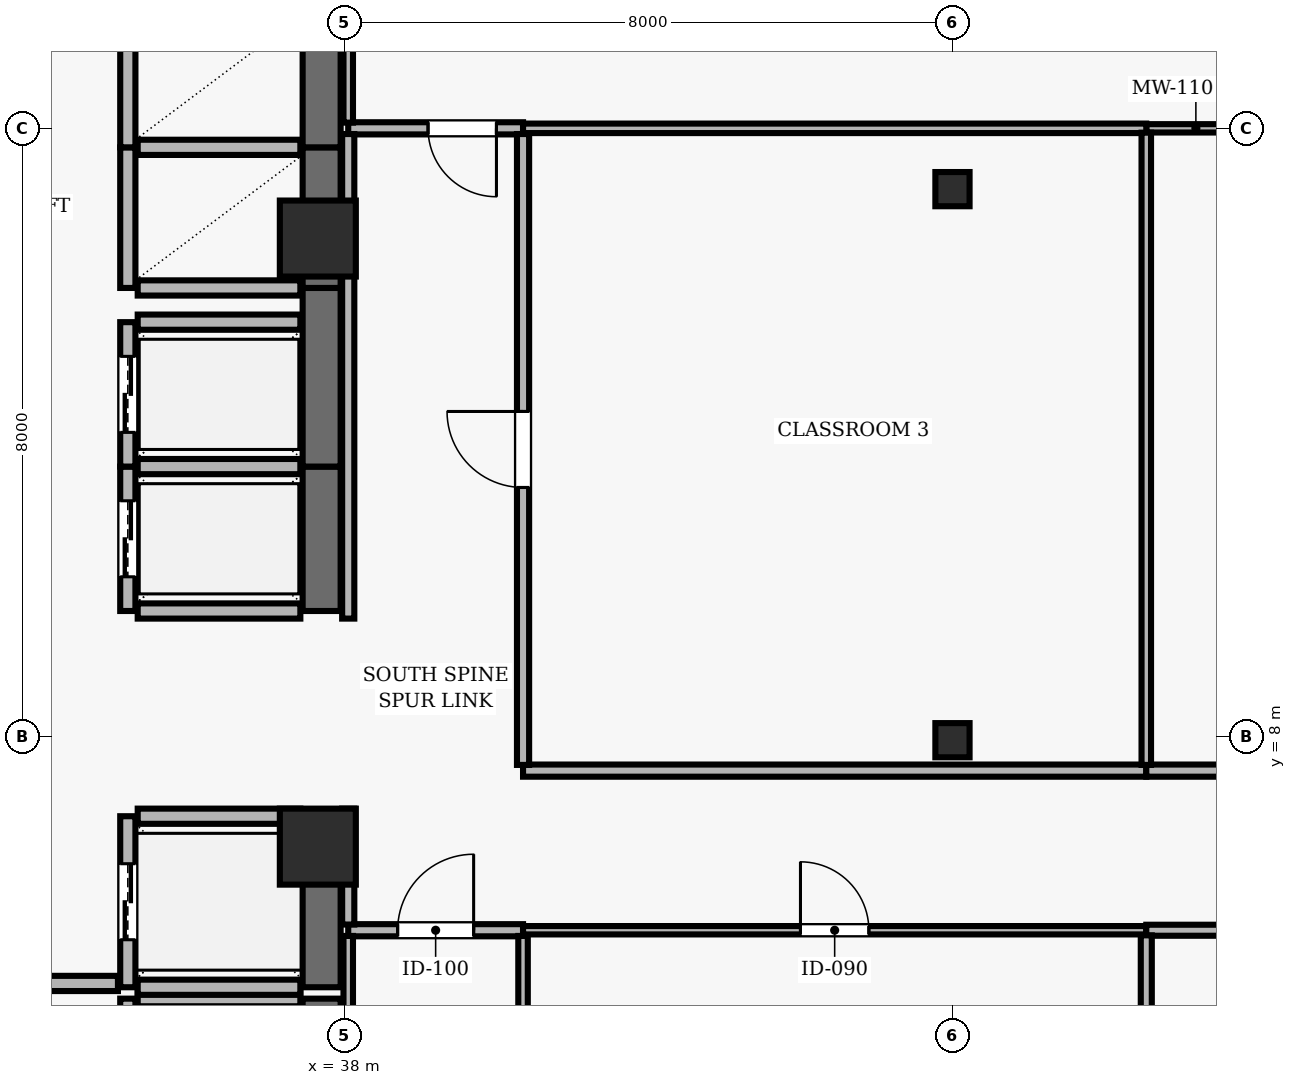
"""IFC4 building model, lengths in metres.
Left out: names, types, materials, properties, quantities, classifications, styles, units other than length and angle.
Written with IfcOpenShell. Run it as: python <this file> out.ifc"""

import sys

from ifc_helpers import new_model, si_unit, direction, frame, frame_2d, origin, origin_2d, place, context, subcontext, project, spatial, rectangle, hollow_rectangle, extrude, element, fill, save


model = new_model("IFC4")
c1 = context("Model", 3, precision=1e-05, world=origin(), true_north=direction((0.0, 1.0)))
c2 = subcontext(c1, "Body", "Model", "MODEL_VIEW")
j1 = project(units=[si_unit("LENGTHUNIT", "METRE"), si_unit("PLANEANGLEUNIT", "RADIAN")], contexts=[c1])
p1 = place(None, origin())
s1 = spatial("IfcSite", under=j1, at=p1, CompositionType="ELEMENT")
p2 = place(p1, origin())
s2 = spatial("IfcBuilding", under=s1, at=p2, CompositionType="ELEMENT")
p3 = place(p2, frame((0.0, 0.0, 183.6)))
s3 = spatial("IfcBuildingStorey", under=s2, at=p3, CompositionType="ELEMENT", Elevation=183.6)
for number, where, z_axis, x_axis in (
    (1, (37.65, 6.55, 0.0), (0.0, 0.0, 1.0), (1.0, 0.0, 0.0)),
    (2, (37.65, 14.55, 0.0), (0.0, 0.0, 1.0), (1.0, 0.0, 0.0)),
):
    element("IfcColumn", number, at=place(p3, frame(where, z_axis=z_axis, x_axis=x_axis)), inside=s3, PredefinedType="COLUMN", context=c2, shape_type="SweptSolid", body=[
        extrude(rectangle(XDim=1.0, YDim=1.0, at=origin_2d()), origin(), (0.0, 0.0, 1.0), 3.9),
    ])
for number, where, z_axis, x_axis in (
    (3, (46.0, 7.95, 0.0), (0.0, 0.0, 1.0), (1.0, 0.0, 0.0)),
    (4, (46.0, 15.2, 0.0), (0.0, 0.0, 1.0), (1.0, 0.0, 0.0)),
):
    element("IfcColumn", number, at=place(p3, frame(where, z_axis=z_axis, x_axis=x_axis)), inside=s3, PredefinedType="COLUMN", context=c2, shape_type="SweptSolid", body=[
        extrude(hollow_rectangle(XDim=0.45, YDim=0.45, WallThickness=0.02, at=origin_2d()), origin(), (0.0, 0.0, 1.0), 3.9),
    ])
p4 = place(p3, frame((35.15, 4.55, 0.0), z_axis=(0.0, 0.0, 1.0), x_axis=(0.0, -1.0, 0.0)))
e5 = element("IfcWall", 5, at=p4, inside=s3, PredefinedType="SOLIDWALL", context=c2, shape_type="SweptSolid", body=[
    extrude(rectangle(XDim=2.1, YDim=0.2, at=frame_2d((1.05, 0.0))), origin(), (0.0, 0.0, 1.0), 3.69),
])
p5 = place(p4, frame((0.45, 0.0, 0.0)))
e6 = element("IfcOpeningElement", 6, at=p5, cuts=e5, PredefinedType="OPENING", context=c2, shape_type="SweptSolid", body=[
    extrude(rectangle(XDim=1.2, YDim=2.15, at=frame_2d((0.6, 1.075))), frame((0.0, 0.11, 0.0), z_axis=(0.0, -1.0, 0.0), x_axis=(1.0, 0.0, 0.0)), (0.0, 0.0, 1.0), 0.22),
])
p6 = place(p3, frame((37.7, 2.45, 0.0), z_axis=(0.0, 0.0, 1.0), x_axis=(0.0, 1.0, 0.0)))
e7 = element("IfcWall", 7, at=p6, inside=s3, PredefinedType="SHEAR", context=c2, shape_type="SweptSolid", body=[
    extrude(rectangle(XDim=2.1, YDim=0.5, at=frame_2d((1.05, 0.0))), origin(), (0.0, 0.0, 1.0), 3.69),
])
p7 = place(p3, frame((37.42, 4.55, 0.0), z_axis=(0.0, 0.0, 1.0), x_axis=(-1.0, 0.0, 0.0)))
e8 = element("IfcWall", 8, at=p7, inside=s3, PredefinedType="SOLIDWALL", context=c2, shape_type="SweptSolid", body=[
    extrude(rectangle(XDim=2.14, YDim=0.2, at=frame_2d((1.07, 0.0))), origin(), (0.0, 0.0, 1.0), 3.69),
])
p8 = place(p3, frame((35.15, 6.95, 0.0), z_axis=(0.0, 0.0, 1.0), x_axis=(0.0, -1.0, 0.0)))
e9 = element("IfcWall", 9, at=p8, inside=s3, PredefinedType="SOLIDWALL", context=c2, shape_type="SweptSolid", body=[
    extrude(rectangle(XDim=2.25, YDim=0.2, at=frame_2d((1.125, 0.0))), origin(), (0.0, 0.0, 1.0), 3.69),
])
p9 = place(p8, frame((0.625, 0.0, 0.0)))
e10 = element("IfcOpeningElement", 10, at=p9, cuts=e9, PredefinedType="OPENING", context=c2, shape_type="SweptSolid", body=[
    extrude(rectangle(XDim=1.0, YDim=2.1, at=frame_2d((0.5, 1.05))), frame((0.0, 0.11, 0.0), z_axis=(0.0, -1.0, 0.0), x_axis=(1.0, 0.0, 0.0)), (0.0, 0.0, 1.0), 0.22),
])
p10 = place(p3, frame((37.7, 4.7, 0.0), z_axis=(0.0, 0.0, 1.0), x_axis=(0.0, 1.0, 0.0)))
e11 = element("IfcWall", 11, at=p10, inside=s3, PredefinedType="SHEAR", context=c2, shape_type="SweptSolid", body=[
    extrude(rectangle(XDim=2.25, YDim=0.5, at=frame_2d((1.125, 0.0))), origin(), (0.0, 0.0, 1.0), 3.69),
])
for number, where, z_axis, x_axis in (
    (12, (35.28, 4.7, 0.0), (0.0, 0.0, 1.0), (1.0, 0.0, 0.0)),
    (13, (37.42, 6.95, 0.0), (0.0, 0.0, 1.0), (-1.0, 0.0, 0.0)),
):
    element("IfcWall", number, at=place(p3, frame(where, z_axis=z_axis, x_axis=x_axis)), inside=s3, PredefinedType="SOLIDWALL", context=c2, shape_type="SweptSolid", body=[
        extrude(rectangle(XDim=2.14, YDim=0.2, at=frame_2d((1.07, 0.0))), origin(), (0.0, 0.0, 1.0), 3.69),
    ])
p11 = place(p3, frame((35.15, 11.55, 0.0), z_axis=(0.0, 0.0, 1.0), x_axis=(0.0, -1.0, 0.0)))
e14 = element("IfcWall", 14, at=p11, inside=s3, PredefinedType="SOLIDWALL", context=c2, shape_type="SweptSolid", body=[
    extrude(rectangle(XDim=1.9, YDim=0.2, at=frame_2d((0.95, 0.0))), origin(), (0.0, 0.0, 1.0), 3.69),
])
p12 = place(p11, frame((0.45, 0.0, 0.0)))
e15 = element("IfcOpeningElement", 15, at=p12, cuts=e14, PredefinedType="OPENING", context=c2, shape_type="SweptSolid", body=[
    extrude(rectangle(XDim=1.0, YDim=2.1, at=frame_2d((0.5, 1.05))), frame((0.0, 0.11, 0.0), z_axis=(0.0, -1.0, 0.0), x_axis=(1.0, 0.0, 0.0)), (0.0, 0.0, 1.0), 0.22),
])
p13 = place(p3, frame((37.7, 9.65, 0.0), z_axis=(0.0, 0.0, 1.0), x_axis=(0.0, 1.0, 0.0)))
e16 = element("IfcWall", 16, at=p13, inside=s3, PredefinedType="SHEAR", context=c2, shape_type="SweptSolid", body=[
    extrude(rectangle(XDim=1.9, YDim=0.5, at=frame_2d((0.95, 0.0))), origin(), (0.0, 0.0, 1.0), 3.69),
])
for number, where, z_axis, x_axis in (
    (17, (35.28, 9.65, 0.0), (0.0, 0.0, 1.0), (1.0, 0.0, 0.0)),
    (18, (37.42, 11.55, 0.0), (0.0, 0.0, 1.0), (-1.0, 0.0, 0.0)),
):
    element("IfcWall", number, at=place(p3, frame(where, z_axis=z_axis, x_axis=x_axis)), inside=s3, PredefinedType="SOLIDWALL", context=c2, shape_type="SweptSolid", body=[
        extrude(rectangle(XDim=2.14, YDim=0.2, at=frame_2d((1.07, 0.0))), origin(), (0.0, 0.0, 1.0), 3.69),
    ])
p14 = place(p3, frame((35.15, 13.45, 0.0), z_axis=(0.0, 0.0, 1.0), x_axis=(0.0, -1.0, 0.0)))
e19 = element("IfcWall", 19, at=p14, inside=s3, PredefinedType="SOLIDWALL", context=c2, shape_type="SweptSolid", body=[
    extrude(rectangle(XDim=1.9, YDim=0.2, at=frame_2d((0.95, 0.0))), origin(), (0.0, 0.0, 1.0), 3.69),
])
p15 = place(p14, frame((0.45, 0.0, 0.0)))
e20 = element("IfcOpeningElement", 20, at=p15, cuts=e19, PredefinedType="OPENING", context=c2, shape_type="SweptSolid", body=[
    extrude(rectangle(XDim=1.0, YDim=2.1, at=frame_2d((0.5, 1.05))), frame((0.0, 0.11, 0.0), z_axis=(0.0, -1.0, 0.0), x_axis=(1.0, 0.0, 0.0)), (0.0, 0.0, 1.0), 0.22),
])
p16 = place(p3, frame((37.7, 11.55, 0.0), z_axis=(0.0, 0.0, 1.0), x_axis=(0.0, 1.0, 0.0)))
e21 = element("IfcWall", 21, at=p16, inside=s3, PredefinedType="SHEAR", context=c2, shape_type="SweptSolid", body=[
    extrude(rectangle(XDim=2.35, YDim=0.5, at=frame_2d((1.175, 0.0))), origin(), (0.0, 0.0, 1.0), 3.69),
])
p17 = place(p3, frame((37.42, 13.45, 0.0), z_axis=(0.0, 0.0, 1.0), x_axis=(-1.0, 0.0, 0.0)))
e22 = element("IfcWall", 22, at=p17, inside=s3, PredefinedType="SOLIDWALL", context=c2, shape_type="SweptSolid", body=[
    extrude(rectangle(XDim=2.14, YDim=0.2, at=frame_2d((1.07, 0.0))), origin(), (0.0, 0.0, 1.0), 3.69),
])
p18 = place(p3, frame((35.15, 15.75, 0.0), z_axis=(0.0, 0.0, 1.0), x_axis=(0.0, -1.0, 0.0)))
e23 = element("IfcWall", 23, at=p18, inside=s3, PredefinedType="SOLIDWALL", context=c2, shape_type="SweptSolid", body=[
    extrude(rectangle(XDim=1.85, YDim=0.2, at=frame_2d((0.925, 0.0))), origin(), (0.0, 0.0, 1.0), 3.69),
])
p19 = place(p3, frame((37.7, 13.9, 0.0), z_axis=(0.0, 0.0, 1.0), x_axis=(0.0, 1.0, 0.0)))
e24 = element("IfcWall", 24, at=p19, inside=s3, PredefinedType="SHEAR", context=c2, shape_type="SweptSolid", body=[
    extrude(rectangle(XDim=1.85, YDim=0.5, at=frame_2d((0.925, 0.0))), origin(), (0.0, 0.0, 1.0), 3.69),
])
for number, where, z_axis, x_axis in (
    (25, (35.28, 13.9, 0.0), (0.0, 0.0, 1.0), (1.0, 0.0, 0.0)),
    (26, (37.42, 15.75, 0.0), (0.0, 0.0, 1.0), (-1.0, 0.0, 0.0)),
):
    element("IfcWall", number, at=place(p3, frame(where, z_axis=z_axis, x_axis=x_axis)), inside=s3, PredefinedType="SOLIDWALL", context=c2, shape_type="SweptSolid", body=[
        extrude(rectangle(XDim=2.14, YDim=0.2, at=frame_2d((1.07, 0.0))), origin(), (0.0, 0.0, 1.0), 3.69),
    ])
p20 = place(p3, frame((35.15, 17.6, 0.0), z_axis=(0.0, 0.0, 1.0), x_axis=(0.0, -1.0, 0.0)))
e27 = element("IfcWall", 27, at=p20, inside=s3, PredefinedType="SOLIDWALL", context=c2, shape_type="SweptSolid", body=[
    extrude(rectangle(XDim=1.85, YDim=0.2, at=frame_2d((0.925, 0.0))), origin(), (0.0, 0.0, 1.0), 3.69),
])
p21 = place(p3, frame((37.7, 15.75, 0.0), z_axis=(0.0, 0.0, 1.0), x_axis=(0.0, 1.0, 0.0)))
e28 = element("IfcWall", 28, at=p21, inside=s3, PredefinedType="SHEAR", context=c2, shape_type="SweptSolid", body=[
    extrude(rectangle(XDim=1.85, YDim=0.5, at=frame_2d((0.925, 0.0))), origin(), (0.0, 0.0, 1.0), 3.69),
])
p22 = place(p3, frame((35.02, 4.75, 0.0), z_axis=(0.0, 0.0, 1.0), x_axis=(-1.0, 0.0, 0.0)))
e29 = element("IfcWall", 29, at=p22, inside=s3, PredefinedType="SOLIDWALL", context=c2, shape_type="SweptSolid", body=[
    extrude(rectangle(XDim=3.11, YDim=0.2, at=frame_2d((1.555, 0.0))), origin(), (0.0, 0.0, 1.0), 3.69),
])
p23 = place(p22, frame((1.03, 0.0, 0.0)))
e30 = element("IfcOpeningElement", 30, at=p23, cuts=e29, PredefinedType="OPENING", context=c2, shape_type="SweptSolid", body=[
    extrude(rectangle(XDim=1.05, YDim=2.15, at=frame_2d((0.525, 1.075))), frame((0.0, 0.11, 0.0), z_axis=(0.0, -1.0, 0.0), x_axis=(1.0, 0.0, 0.0)), (0.0, 0.0, 1.0), 0.22),
])
p24 = place(p3, frame((38.05, 5.45, 0.0), z_axis=(0.0, 0.0, 1.0), x_axis=(1.0, 0.0, 0.0)))
e31 = element("IfcWall", 31, at=p24, inside=s3, PredefinedType="PARTITIONING", context=c2, shape_type="SweptSolid", body=[
    extrude(rectangle(XDim=2.3, YDim=0.16, at=frame_2d((1.15, 0.0))), origin(), (0.0, 0.0, 1.0), 3.343),
])
p25 = place(p24, frame((0.65, 0.0, 0.0)))
e32 = element("IfcOpeningElement", 32, at=p25, cuts=e31, PredefinedType="OPENING", context=c2, shape_type="SweptSolid", body=[
    extrude(rectangle(XDim=1.0, YDim=2.1, at=frame_2d((0.5, 1.05))), frame((0.0, 0.09, 0.0), z_axis=(0.0, -1.0, 0.0), x_axis=(1.0, 0.0, 0.0)), (0.0, 0.0, 1.0), 0.18),
])
p26 = place(p3, frame((40.35, 5.45, 0.0), z_axis=(0.0, 0.0, 1.0), x_axis=(1.0, 0.0, 0.0)))
e33 = element("IfcWall", 33, at=p26, inside=s3, PredefinedType="MOVABLE", context=c2, shape_type="SweptSolid", body=[
    extrude(rectangle(XDim=8.2, YDim=0.11, at=frame_2d((4.1, 0.0))), origin(), (0.0, 0.0, 1.0), 3.343),
])
p27 = place(p26, frame((3.65, 0.0, 0.0)))
e34 = element("IfcOpeningElement", 34, at=p27, cuts=e33, PredefinedType="OPENING", context=c2, shape_type="SweptSolid", body=[
    extrude(rectangle(XDim=0.9, YDim=2.1, at=frame_2d((0.45, 1.05))), frame((0.0, 0.065, 0.0), z_axis=(0.0, -1.0, 0.0), x_axis=(1.0, 0.0, 0.0)), (0.0, 0.0, 1.0), 0.13),
])
p28 = place(p3, frame((40.35, 16.0, 0.0), z_axis=(0.0, 0.0, 1.0), x_axis=(-1.0, 0.0, 0.0)))
e35 = element("IfcWall", 35, at=p28, inside=s3, PredefinedType="PARTITIONING", context=c2, shape_type="SweptSolid", body=[
    extrude(rectangle(XDim=2.3, YDim=0.16, at=frame_2d((1.15, 0.0))), origin(), (0.0, 0.0, 1.0), 3.69),
])
p29 = place(p28, frame((0.35, 0.0, 0.0)))
e36 = element("IfcOpeningElement", 36, at=p29, cuts=e35, PredefinedType="OPENING", context=c2, shape_type="SweptSolid", body=[
    extrude(rectangle(XDim=0.9, YDim=2.1, at=frame_2d((0.45, 1.05))), frame((0.0, 0.09, 0.0), z_axis=(0.0, -1.0, 0.0), x_axis=(1.0, 0.0, 0.0)), (0.0, 0.0, 1.0), 0.18),
])
p30 = place(p3, frame((48.55, 5.45, 0.0), z_axis=(0.0, 0.0, 1.0), x_axis=(1.0, 0.0, 0.0)))
e37 = element("IfcWall", 37, at=p30, inside=s3, PredefinedType="PARTITIONING", context=c2, shape_type="SweptSolid", body=[
    extrude(rectangle(XDim=9.25, YDim=0.145, at=frame_2d((4.625, 0.0))), origin(), (0.0, 0.0, 1.0), 3.343),
])
p31 = place(p30, frame((4.075, 0.0, 0.0)))
e38 = element("IfcOpeningElement", 38, at=p31, cuts=e37, PredefinedType="OPENING", context=c2, shape_type="SweptSolid", body=[
    extrude(rectangle(XDim=1.1, YDim=2.15, at=frame_2d((0.55, 1.075))), frame((0.0, 0.083, 0.0), z_axis=(0.0, -1.0, 0.0), x_axis=(1.0, 0.0, 0.0)), (0.0, 0.0, 1.0), 0.165),
])
p32 = place(p3, frame((48.55, 7.55, 0.0), z_axis=(0.0, 0.0, 1.0), x_axis=(-1.0, 0.0, 0.0)))
e39 = element("IfcWall", 39, at=p32, inside=s3, PredefinedType="PARTITIONING", context=c2, shape_type="SweptSolid", body=[
    extrude(rectangle(XDim=8.2, YDim=0.16, at=frame_2d((4.1, 0.0))), origin(), (0.0, 0.0, 1.0), 3.139),
])
p33 = place(p3, frame((48.55, 16.0, 0.0), z_axis=(0.0, 0.0, 1.0), x_axis=(1.0, 0.0, 0.0)))
e40 = element("IfcWall", 40, at=p33, inside=s3, PredefinedType="MOVABLE", context=c2, shape_type="SweptSolid", body=[
    extrude(rectangle(XDim=1.305, YDim=0.11, at=frame_2d((0.652, 0.0))), origin(), (0.0, 0.0, 1.0), 3.39),
])
p34 = place(p3, frame((48.55, 16.0, 0.0), z_axis=(0.0, 0.0, 1.0), x_axis=(-1.0, 0.0, 0.0)))
e41 = element("IfcWall", 41, at=p34, inside=s3, PredefinedType="PARTITIONING", context=c2, shape_type="SweptSolid", body=[
    extrude(rectangle(XDim=8.2, YDim=0.125, at=frame_2d((4.1, 0.0))), origin(), (0.0, 0.0, 1.0), 3.39),
])
p35 = place(p3, frame((57.8, 7.55, 0.0), z_axis=(0.0, 0.0, 1.0), x_axis=(-1.0, 0.0, 0.0)))
e42 = element("IfcWall", 42, at=p35, inside=s3, PredefinedType="PARTITIONING", context=c2, shape_type="SweptSolid", body=[
    extrude(rectangle(XDim=9.25, YDim=0.16, at=frame_2d((4.625, 0.0))), origin(), (0.0, 0.0, 1.0), 3.139),
])
p36 = place(p35, frame((3.125, 0.0, 0.0)))
e43 = element("IfcOpeningElement", 43, at=p36, cuts=e42, PredefinedType="OPENING", context=c2, shape_type="SweptSolid", body=[
    extrude(rectangle(XDim=0.9, YDim=2.1, at=frame_2d((0.45, 1.05))), frame((0.0, 0.09, 0.0), z_axis=(0.0, -1.0, 0.0), x_axis=(1.0, 0.0, 0.0)), (0.0, 0.0, 1.0), 0.18),
])
p37 = place(p3, frame((38.05, 5.375, 0.0), z_axis=(0.0, 0.0, 1.0), x_axis=(0.0, -1.0, 0.0)))
e44 = element("IfcWall", 44, at=p37, inside=s3, PredefinedType="PARTITIONING", context=c2, shape_type="SweptSolid", body=[
    extrude(rectangle(XDim=5.23, YDim=0.125, at=frame_2d((2.615, 0.0))), origin(), (0.0, 0.0, 1.0), 3.139),
])
p38 = place(p3, frame((38.05, 7.05, 0.0), z_axis=(0.0, 0.0, 1.0), x_axis=(0.0, -1.0, 0.0)))
e45 = element("IfcWall", 45, at=p38, inside=s3, PredefinedType="PARTITIONING", context=c2, shape_type="SweptSolid", body=[
    extrude(rectangle(XDim=1.525, YDim=0.16, at=frame_2d((0.763, 0.0))), origin(), (0.0, 0.0, 1.0), 3.139),
])
p39 = place(p3, frame((38.05, 15.925, 0.0), z_axis=(0.0, 0.0, 1.0), x_axis=(0.0, -1.0, 0.0)))
e46 = element("IfcWall", 46, at=p39, inside=s3, PredefinedType="PARTITIONING", context=c2, shape_type="SweptSolid", body=[
    extrude(rectangle(XDim=6.375, YDim=0.16, at=frame_2d((3.188, 0.0))), origin(), (0.0, 0.0, 1.0), 3.139),
])
p40 = place(p3, frame((38.05, 24.0, 0.0), z_axis=(0.0, 0.0, 1.0), x_axis=(0.0, -1.0, 0.0)))
e47 = element("IfcWall", 47, at=p40, inside=s3, PredefinedType="PARTITIONING", context=c2, shape_type="SweptSolid", body=[
    extrude(rectangle(XDim=7.925, YDim=0.125, at=frame_2d((3.962, 0.0))), origin(), (0.0, 0.0, 1.0), 3.139),
])
p41 = place(p3, frame((40.35, 0.09, 0.0), z_axis=(0.0, 0.0, 1.0), x_axis=(0.0, 1.0, 0.0)))
e48 = element("IfcWall", 48, at=p41, inside=s3, PredefinedType="PARTITIONING", context=c2, shape_type="SweptSolid", body=[
    extrude(rectangle(XDim=5.285, YDim=0.125, at=frame_2d((2.643, 0.0))), origin(), (0.0, 0.0, 1.0), 3.69),
])
p42 = place(p3, frame((40.35, 7.625, 0.0), z_axis=(0.0, 0.0, 1.0), x_axis=(0.0, 1.0, 0.0)))
e49 = element("IfcWall", 49, at=p42, inside=s3, PredefinedType="PARTITIONING", context=c2, shape_type="SweptSolid", body=[
    extrude(rectangle(XDim=8.3, YDim=0.16, at=frame_2d((4.15, 0.0))), origin(), (0.0, 0.0, 1.0), 3.343),
])
p43 = place(p42, frame((3.65, 0.0, 0.0)))
e50 = element("IfcOpeningElement", 50, at=p43, cuts=e49, PredefinedType="OPENING", context=c2, shape_type="SweptSolid", body=[
    extrude(rectangle(XDim=1.0, YDim=2.1, at=frame_2d((0.5, 1.05))), frame((0.0, 0.09, 0.0), z_axis=(0.0, -1.0, 0.0), x_axis=(1.0, 0.0, 0.0)), (0.0, 0.0, 1.0), 0.18),
])
p44 = place(p3, frame((48.55, 0.09, 0.0), z_axis=(0.0, 0.0, 1.0), x_axis=(0.0, 1.0, 0.0)))
e51 = element("IfcWall", 51, at=p44, inside=s3, PredefinedType="PARTITIONING", context=c2, shape_type="SweptSolid", body=[
    extrude(rectangle(XDim=5.293, YDim=0.145, at=frame_2d((2.646, 0.0))), origin(), (0.0, 0.0, 1.0), 3.69),
])
p45 = place(p3, frame((48.55, 7.625, 0.0), z_axis=(0.0, 0.0, 1.0), x_axis=(0.0, 1.0, 0.0)))
e52 = element("IfcWall", 52, at=p45, inside=s3, PredefinedType="PARTITIONING", context=c2, shape_type="SweptSolid", body=[
    extrude(rectangle(XDim=8.318, YDim=0.125, at=frame_2d((4.159, 0.0))), origin(), (0.0, 0.0, 1.0), 3.69),
])
p46 = place(p9, origin())
e53 = element("IfcDoor", 53, at=p46, inside=s3, OperationType="DOUBLE_DOOR_SLIDING", PredefinedType="DOOR", context=c2, shape_type="SweptSolid", body=[
    extrude(rectangle(XDim=1.0, YDim=2.1, at=frame_2d((0.5, 1.05))), frame((0.0, 0.025, 0.0), z_axis=(0.0, -1.0, 0.0), x_axis=(1.0, 0.0, 0.0)), (0.0, 0.0, 1.0), 0.05),
])
fill(e10, e53)
p47 = place(p12, origin())
e54 = element("IfcDoor", 54, at=p47, inside=s3, OperationType="DOUBLE_DOOR_SLIDING", PredefinedType="DOOR", context=c2, shape_type="SweptSolid", body=[
    extrude(rectangle(XDim=1.0, YDim=2.1, at=frame_2d((0.5, 1.05))), frame((0.0, 0.025, 0.0), z_axis=(0.0, -1.0, 0.0), x_axis=(1.0, 0.0, 0.0)), (0.0, 0.0, 1.0), 0.05),
])
fill(e15, e54)
p48 = place(p15, origin())
e55 = element("IfcDoor", 55, at=p48, inside=s3, OperationType="DOUBLE_DOOR_SLIDING", PredefinedType="DOOR", context=c2, shape_type="SweptSolid", body=[
    extrude(rectangle(XDim=1.0, YDim=2.1, at=frame_2d((0.5, 1.05))), frame((0.0, 0.025, 0.0), z_axis=(0.0, -1.0, 0.0), x_axis=(1.0, 0.0, 0.0)), (0.0, 0.0, 1.0), 0.05),
])
fill(e20, e55)
p49 = place(p25, origin())
e56 = element("IfcDoor", 56, at=p49, inside=s3, OperationType="SINGLE_SWING_RIGHT", PredefinedType="DOOR", context=c2, shape_type="SweptSolid", body=[
    extrude(rectangle(XDim=1.0, YDim=2.1, at=frame_2d((0.5, 1.05))), frame((0.0, 0.025, 0.0), z_axis=(0.0, -1.0, 0.0), x_axis=(1.0, 0.0, 0.0)), (0.0, 0.0, 1.0), 0.05),
])
fill(e32, e56)
p50 = place(p27, origin())
e57 = element("IfcDoor", 57, at=p50, inside=s3, OperationType="SINGLE_SWING_LEFT", PredefinedType="DOOR", context=c2, shape_type="SweptSolid", body=[
    extrude(rectangle(XDim=0.9, YDim=2.1, at=frame_2d((0.45, 1.05))), frame((0.0, 0.025, 0.0), z_axis=(0.0, -1.0, 0.0), x_axis=(1.0, 0.0, 0.0)), (0.0, 0.0, 1.0), 0.05),
])
fill(e34, e57)
p51 = place(p43, origin())
e58 = element("IfcDoor", 58, at=p51, inside=s3, OperationType="SINGLE_SWING_RIGHT", PredefinedType="DOOR", context=c2, shape_type="SweptSolid", body=[
    extrude(rectangle(XDim=1.0, YDim=2.1, at=frame_2d((0.5, 1.05))), frame((0.0, 0.025, 0.0), z_axis=(0.0, -1.0, 0.0), x_axis=(1.0, 0.0, 0.0)), (0.0, 0.0, 1.0), 0.05),
])
fill(e50, e58)
p52 = place(p29, origin())
e59 = element("IfcDoor", 59, at=p52, inside=s3, OperationType="SINGLE_SWING_LEFT", PredefinedType="DOOR", context=c2, shape_type="SweptSolid", body=[
    extrude(rectangle(XDim=0.9, YDim=2.1, at=frame_2d((0.45, 1.05))), frame((0.0, 0.025, 0.0), z_axis=(0.0, -1.0, 0.0), x_axis=(1.0, 0.0, 0.0)), (0.0, 0.0, 1.0), 0.05),
])
fill(e36, e59)
save(model, sys.argv[1])
